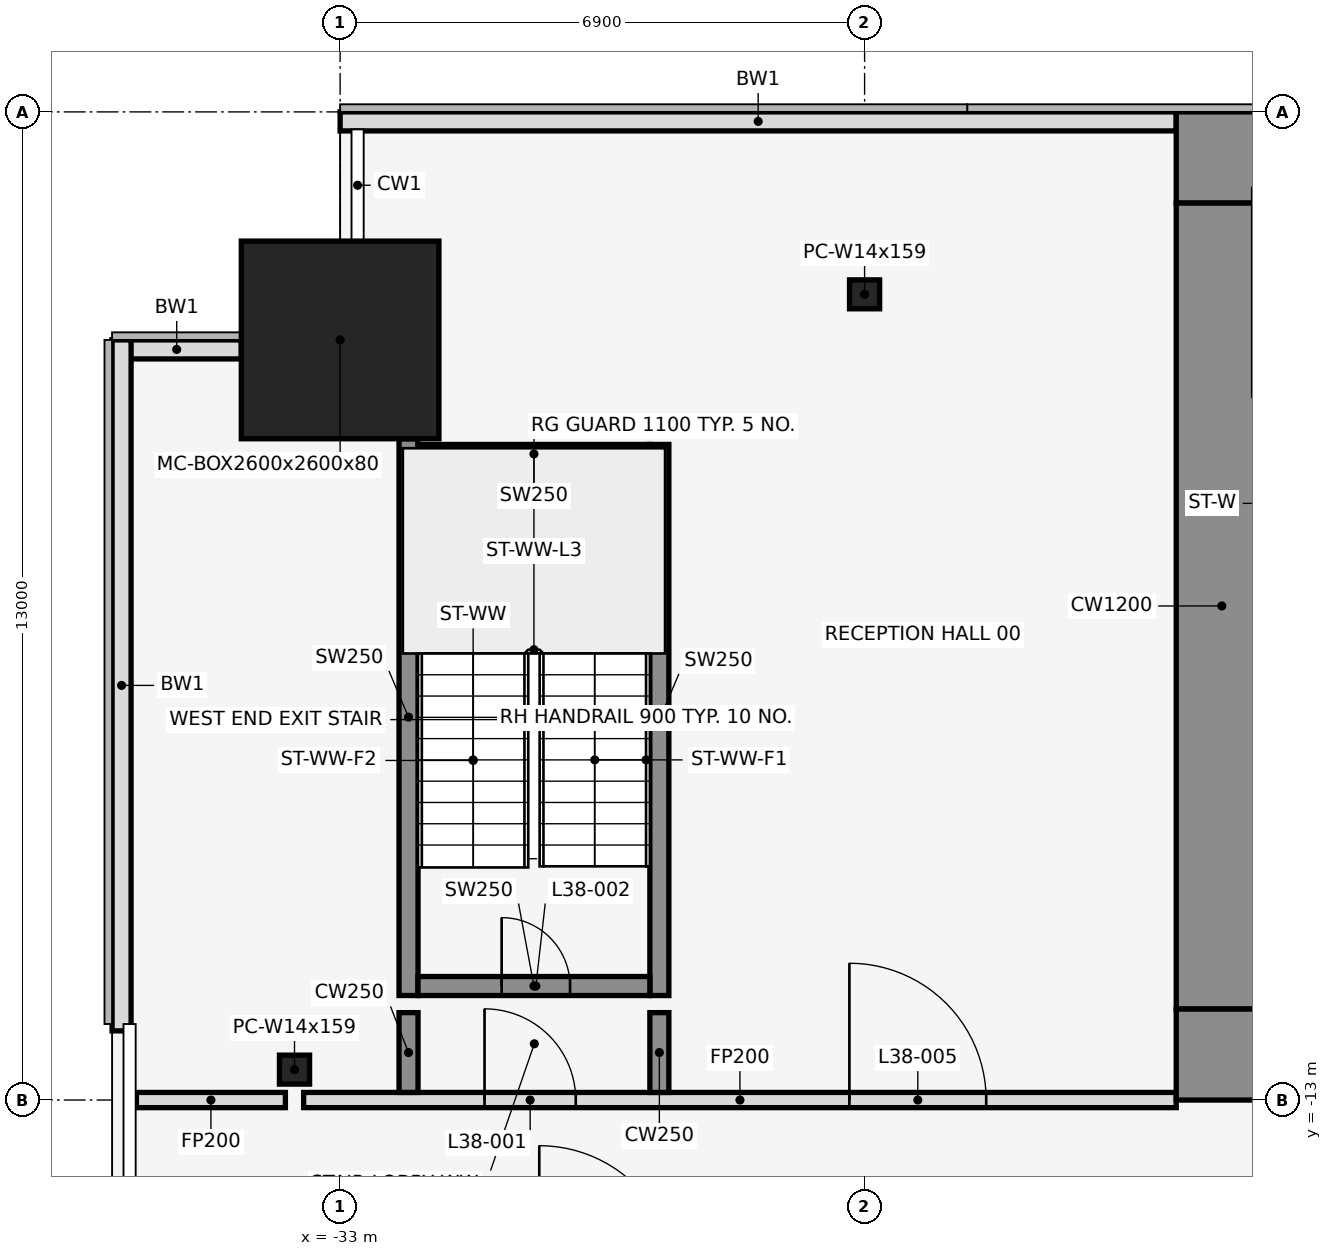
"""IFC4 building model, lengths in metres.
Left out: names, types, materials, properties, quantities, classifications, styles, units other than length and angle.
Written with IfcOpenShell. Run it as: python <this file> out.ifc"""

import sys

from ifc_helpers import new_model, si_unit, direction, frame, frame_2d, origin, origin_2d, place, context, subcontext, project, spatial, rectangle, hollow_rectangle, i_section, extrude, element, fill, save


model = new_model("IFC4")
c1 = context("Model", 3, precision=1e-05, world=origin(), true_north=direction((0.0, 1.0)))
c2 = subcontext(c1, "Body", "Model", "MODEL_VIEW")
j1 = project(units=[si_unit("LENGTHUNIT", "METRE"), si_unit("PLANEANGLEUNIT", "RADIAN")], contexts=[c1])
p1 = place(None, origin())
s1 = spatial("IfcSite", under=j1, at=p1, CompositionType="ELEMENT")
p2 = place(p1, origin())
s2 = spatial("IfcBuilding", under=s1, at=p2, CompositionType="ELEMENT")
p3 = place(p2, frame((0.0, 0.0, 173.2)))
s3 = spatial("IfcBuildingStorey", under=s2, at=p3, CompositionType="ELEMENT", Elevation=173.2)
p4 = place(p3, frame((-33.0, -3.0, 0.0), z_axis=(0.0, 0.0, 1.0), x_axis=(1.0, 0.0, 0.0)))
e1 = element("IfcColumn", 1, at=p4, inside=s3, PredefinedType="COLUMN", context=c2, shape_type="SweptSolid", body=[
    extrude(hollow_rectangle(XDim=2.6, YDim=2.6, WallThickness=0.08, at=origin_2d()), origin(), (0.0, 0.0, 1.0), 4.1),
])
for number, where, z_axis, x_axis in (
    (2, (-26.1, -2.4, 0.0), (0.0, 0.0, 1.0), (1.0, 0.0, 0.0)),
    (3, (-33.6, -12.6, 0.0), (0.0, 0.0, 1.0), (1.0, 0.0, 0.0)),
):
    element("IfcColumn", number, at=place(p3, frame(where, z_axis=z_axis, x_axis=x_axis)), inside=s3, PredefinedType="COLUMN", context=c2, shape_type="SweptSolid", body=[
        extrude(i_section(OverallWidth=0.396, OverallDepth=0.381, WebThickness=0.019, FlangeThickness=0.03, at=origin_2d()), origin(), (0.0, 0.0, 1.0), 4.1),
    ])
p5 = place(p3, frame((-22.0, -0.125, 0.0), z_axis=(0.0, 0.0, 1.0), x_axis=(-1.0, 0.0, 0.0)))
e4 = element("IfcWall", 4, at=p5, inside=s3, PredefinedType="STANDARD", context=c2, shape_type="SweptSolid", body=[
    extrude(rectangle(XDim=11.0, YDim=0.25, at=frame_2d((5.5, 0.0))), origin(), (0.0, 0.0, 1.0), 3.95),
])
p6 = place(p3, frame((-34.3, -3.125, 0.0), z_axis=(0.0, 0.0, 1.0), x_axis=(-1.0, 0.0, 0.0)))
e5 = element("IfcWall", 5, at=p6, inside=s3, PredefinedType="STANDARD", context=c2, shape_type="SweptSolid", body=[
    extrude(rectangle(XDim=1.7, YDim=0.25, at=frame_2d((0.85, 0.0))), origin(), (0.0, 0.0, 1.0), 3.95),
])
p7 = place(p3, frame((-35.875, -3.0, 0.0), z_axis=(0.0, 0.0, 1.0), x_axis=(0.0, -1.0, 0.0)))
e6 = element("IfcWall", 6, at=p7, inside=s3, PredefinedType="STANDARD", context=c2, shape_type="SweptSolid", body=[
    extrude(rectangle(XDim=9.09, YDim=0.25, at=frame_2d((4.545, 0.0))), origin(), (0.0, 0.0, 1.0), 3.95),
])
p8 = place(p3, frame((-32.1, -11.625, 0.0), z_axis=(0.0, 0.0, 1.0), x_axis=(0.0, 1.0, 0.0)))
e7 = element("IfcWall", 7, at=p8, inside=s3, PredefinedType="SHEAR", context=c2, shape_type="SweptSolid", body=[
    extrude(rectangle(XDim=7.325, YDim=0.25, at=frame_2d((3.663, 0.0))), origin(), (0.0, 0.0, 1.0), 4.1),
])
p9 = place(p3, frame((-28.8, -11.625, 0.0), z_axis=(0.0, 0.0, 1.0), x_axis=(0.0, 1.0, 0.0)))
e8 = element("IfcWall", 8, at=p9, inside=s3, PredefinedType="SHEAR", context=c2, shape_type="SweptSolid", body=[
    extrude(rectangle(XDim=7.25, YDim=0.25, at=frame_2d((3.625, 0.0))), origin(), (0.0, 0.0, 1.0), 4.1),
])
p10 = place(p3, frame((-31.975, -11.5, 0.0), z_axis=(0.0, 0.0, 1.0), x_axis=(1.0, 0.0, 0.0)))
e9 = element("IfcWall", 9, at=p10, inside=s3, PredefinedType="SHEAR", context=c2, shape_type="SweptSolid", body=[
    extrude(rectangle(XDim=3.05, YDim=0.25, at=frame_2d((1.525, 0.0))), origin(), (0.0, 0.0, 1.0), 4.1),
])
p11 = place(p10, frame((1.1, 0.0, 0.0)))
e10 = element("IfcOpeningElement", 10, at=p11, cuts=e9, PredefinedType="OPENING", context=c2, shape_type="SweptSolid", body=[
    extrude(rectangle(XDim=0.9, YDim=2.1, at=frame_2d((0.45, 1.05))), frame((0.0, 0.137, 0.0), z_axis=(0.0, -1.0, 0.0), x_axis=(1.0, 0.0, 0.0)), (0.0, 0.0, 1.0), 0.274),
])
p12 = place(p3, frame((-31.975, -4.5, 0.0), z_axis=(0.0, 0.0, 1.0), x_axis=(1.0, 0.0, 0.0)))
e11 = element("IfcWall", 11, at=p12, inside=s3, PredefinedType="SHEAR", context=c2, shape_type="SweptSolid", body=[
    extrude(rectangle(XDim=3.05, YDim=0.25, at=frame_2d((1.525, 0.0))), origin(), (0.0, 0.0, 1.0), 4.1),
])
p13 = place(p3, frame((-35.68, -13.0, 0.0), z_axis=(0.0, 0.0, 1.0), x_axis=(1.0, 0.0, 0.0)))
e12 = element("IfcWall", 12, at=p13, inside=s3, PredefinedType="PARTITIONING", context=c2, shape_type="SweptSolid", body=[
    extrude(rectangle(XDim=1.96, YDim=0.2, at=frame_2d((0.98, 0.0))), origin(), (0.0, 0.0, 1.0), 2.84),
])
p14 = place(p3, frame((-33.48, -13.0, 0.0), z_axis=(0.0, 0.0, 1.0), x_axis=(1.0, 0.0, 0.0)))
e13 = element("IfcWall", 13, at=p14, inside=s3, PredefinedType="PARTITIONING", context=c2, shape_type="SweptSolid", body=[
    extrude(rectangle(XDim=11.48, YDim=0.2, at=frame_2d((5.74, 0.0))), origin(), (0.0, 0.0, 1.0), 2.84),
])
p15 = place(p14, frame((2.38, 0.0, 0.0)))
e14 = element("IfcOpeningElement", 14, at=p15, cuts=e13, PredefinedType="OPENING", context=c2, shape_type="SweptSolid", body=[
    extrude(rectangle(XDim=1.2, YDim=2.1, at=frame_2d((0.6, 1.05))), frame((0.0, 0.112, 0.0), z_axis=(0.0, -1.0, 0.0), x_axis=(1.0, 0.0, 0.0)), (0.0, 0.0, 1.0), 0.224),
])
p16 = place(p14, frame((7.18, 0.0, 0.0)))
e15 = element("IfcOpeningElement", 15, at=p16, cuts=e13, PredefinedType="OPENING", context=c2, shape_type="SweptSolid", body=[
    extrude(rectangle(XDim=1.8, YDim=2.1, at=frame_2d((0.9, 1.05))), frame((0.0, 0.112, 0.0), z_axis=(0.0, -1.0, 0.0), x_axis=(1.0, 0.0, 0.0)), (0.0, 0.0, 1.0), 0.224),
])
for number, where, z_axis, x_axis in (
    (16, (-32.1, -12.9, 0.0), (0.0, 0.0, 1.0), (0.0, 1.0, 0.0)),
    (17, (-28.8, -12.9, 0.0), (0.0, 0.0, 1.0), (0.0, 1.0, 0.0)),
):
    element("IfcWall", number, at=place(p3, frame(where, z_axis=z_axis, x_axis=x_axis)), inside=s3, PredefinedType="SHEAR", context=c2, shape_type="SweptSolid", body=[
        extrude(rectangle(XDim=1.05, YDim=0.25, at=frame_2d((0.525, 0.0))), origin(), (0.0, 0.0, 1.0), 4.1),
    ])
p17 = place(p3, frame((-22.0, -0.6, 0.0), z_axis=(0.0, 0.0, 1.0), x_axis=(1.0, 0.0, 0.0)))
e18 = element("IfcWall", 18, at=p17, inside=s3, PredefinedType="SHEAR", context=c2, shape_type="SweptSolid", body=[
    extrude(rectangle(XDim=44.0, YDim=1.2, at=frame_2d((22.0, 0.0))), origin(), (0.0, 0.0, 1.0), 4.1),
])
p18 = place(p17, frame((18.55, 0.0, 0.0)))
e19 = element("IfcOpeningElement", 19, at=p18, cuts=e18, PredefinedType="OPENING", context=c2, shape_type="SweptSolid", body=[
    extrude(rectangle(XDim=0.9, YDim=2.1, at=frame_2d((0.45, 1.05))), frame((0.0, 0.612, 0.0), z_axis=(0.0, -1.0, 0.0), x_axis=(1.0, 0.0, 0.0)), (0.0, 0.0, 1.0), 1.224),
])
p19 = place(p17, frame((24.55, 0.0, 0.0)))
e20 = element("IfcOpeningElement", 20, at=p19, cuts=e18, PredefinedType="OPENING", context=c2, shape_type="SweptSolid", body=[
    extrude(rectangle(XDim=0.9, YDim=2.1, at=frame_2d((0.45, 1.05))), frame((0.0, 0.612, 0.0), z_axis=(0.0, -1.0, 0.0), x_axis=(1.0, 0.0, 0.0)), (0.0, 0.0, 1.0), 1.224),
])
p20 = place(p3, frame((-22.0, -12.4, 0.0), z_axis=(0.0, 0.0, 1.0), x_axis=(1.0, 0.0, 0.0)))
e21 = element("IfcWall", 21, at=p20, inside=s3, PredefinedType="SHEAR", context=c2, shape_type="SweptSolid", body=[
    extrude(rectangle(XDim=44.0, YDim=1.2, at=frame_2d((22.0, 0.0))), origin(), (0.0, 0.0, 1.0), 4.1),
])
p21 = place(p20, frame((2.2, 0.0, 0.0)))
e22 = element("IfcOpeningElement", 22, at=p21, cuts=e21, PredefinedType="OPENING", context=c2, shape_type="SweptSolid", body=[
    extrude(rectangle(XDim=1.2, YDim=2.1, at=frame_2d((0.6, 1.05))), frame((0.0, 0.612, 0.0), z_axis=(0.0, -1.0, 0.0), x_axis=(1.0, 0.0, 0.0)), (0.0, 0.0, 1.0), 1.224),
])
p22 = place(p20, frame((21.4, 0.0, 0.0)))
e23 = element("IfcOpeningElement", 23, at=p22, cuts=e21, PredefinedType="OPENING", context=c2, shape_type="SweptSolid", body=[
    extrude(rectangle(XDim=1.2, YDim=2.1, at=frame_2d((0.6, 1.05))), frame((0.0, 0.612, 0.0), z_axis=(0.0, -1.0, 0.0), x_axis=(1.0, 0.0, 0.0)), (0.0, 0.0, 1.0), 1.224),
])
p23 = place(p20, frame((40.6, 0.0, 0.0)))
e24 = element("IfcOpeningElement", 24, at=p23, cuts=e21, PredefinedType="OPENING", context=c2, shape_type="SweptSolid", body=[
    extrude(rectangle(XDim=1.2, YDim=2.1, at=frame_2d((0.6, 1.05))), frame((0.0, 0.612, 0.0), z_axis=(0.0, -1.0, 0.0), x_axis=(1.0, 0.0, 0.0)), (0.0, 0.0, 1.0), 1.224),
])
p24 = place(p20, frame((16.0, 0.0, 0.0)))
e25 = element("IfcOpeningElement", 25, at=p24, cuts=e21, PredefinedType="OPENING", context=c2, shape_type="SweptSolid", body=[
    extrude(rectangle(XDim=1.8, YDim=2.1, at=frame_2d((0.9, 1.05))), frame((0.0, 0.612, 0.0), z_axis=(0.0, -1.0, 0.0), x_axis=(1.0, 0.0, 0.0)), (0.0, 0.0, 1.0), 1.224),
])
p25 = place(p20, frame((6.3, 0.0, 0.0)))
e26 = element("IfcOpeningElement", 26, at=p25, cuts=e21, PredefinedType="OPENING", context=c2, shape_type="SweptSolid", body=[
    extrude(rectangle(XDim=1.2, YDim=2.1, at=frame_2d((0.6, 1.05))), frame((0.0, 0.612, 0.0), z_axis=(0.0, -1.0, 0.0), x_axis=(1.0, 0.0, 0.0)), (0.0, 0.0, 1.0), 1.224),
])
p26 = place(p20, frame((26.2, 0.0, 0.0)))
e27 = element("IfcOpeningElement", 27, at=p26, cuts=e21, PredefinedType="OPENING", context=c2, shape_type="SweptSolid", body=[
    extrude(rectangle(XDim=1.8, YDim=2.1, at=frame_2d((0.9, 1.05))), frame((0.0, 0.612, 0.0), z_axis=(0.0, -1.0, 0.0), x_axis=(1.0, 0.0, 0.0)), (0.0, 0.0, 1.0), 1.224),
])
p27 = place(p20, frame((36.5, 0.0, 0.0)))
e28 = element("IfcOpeningElement", 28, at=p27, cuts=e21, PredefinedType="OPENING", context=c2, shape_type="SweptSolid", body=[
    extrude(rectangle(XDim=1.2, YDim=2.1, at=frame_2d((0.6, 1.05))), frame((0.0, 0.612, 0.0), z_axis=(0.0, -1.0, 0.0), x_axis=(1.0, 0.0, 0.0)), (0.0, 0.0, 1.0), 1.224),
])
p28 = place(p3, frame((-21.4, -11.8, 0.0), z_axis=(0.0, 0.0, 1.0), x_axis=(0.0, 1.0, 0.0)))
e29 = element("IfcWall", 29, at=p28, inside=s3, PredefinedType="SHEAR", context=c2, shape_type="SweptSolid", body=[
    extrude(rectangle(XDim=10.6, YDim=1.2, at=frame_2d((5.3, 0.0))), origin(), (0.0, 0.0, 1.0), 4.1),
])
p29 = place(p15, origin())
e30 = element("IfcDoor", 30, at=p29, inside=s3, OperationType="SINGLE_SWING_LEFT", PredefinedType="DOOR", context=c2, shape_type="SweptSolid", body=[
    extrude(rectangle(XDim=1.2, YDim=2.1, at=frame_2d((0.6, 1.05))), frame((0.0, 0.025, 0.0), z_axis=(0.0, -1.0, 0.0), x_axis=(1.0, 0.0, 0.0)), (0.0, 0.0, 1.0), 0.05),
])
fill(e14, e30)
p30 = place(p11, origin())
e31 = element("IfcDoor", 31, at=p30, inside=s3, OperationType="SINGLE_SWING_LEFT", PredefinedType="DOOR", context=c2, shape_type="SweptSolid", body=[
    extrude(rectangle(XDim=0.9, YDim=2.1, at=frame_2d((0.45, 1.05))), frame((0.0, 0.025, 0.0), z_axis=(0.0, -1.0, 0.0), x_axis=(1.0, 0.0, 0.0)), (0.0, 0.0, 1.0), 0.05),
])
fill(e10, e31)
p31 = place(p16, origin())
e32 = element("IfcDoor", 32, at=p31, inside=s3, OperationType="SINGLE_SWING_LEFT", PredefinedType="DOOR", context=c2, shape_type="SweptSolid", body=[
    extrude(rectangle(XDim=1.8, YDim=2.1, at=frame_2d((0.9, 1.05))), frame((0.0, 0.025, 0.0), z_axis=(0.0, -1.0, 0.0), x_axis=(1.0, 0.0, 0.0)), (0.0, 0.0, 1.0), 0.05),
])
fill(e15, e32)
save(model, sys.argv[1])
